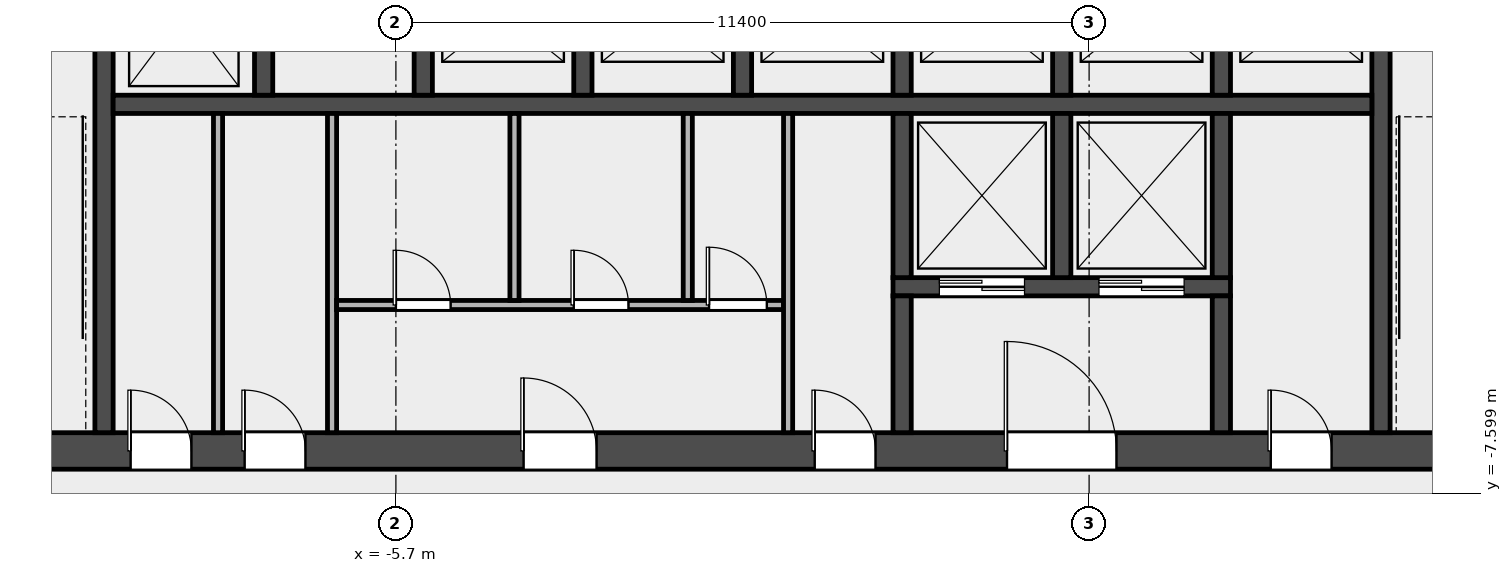
"""IFC4 building model, lengths in metres.
Left out: names, types, materials, properties, quantities, classifications, styles, units other than length and angle.
Written with IfcOpenShell. Run it as: python <this file> out.ifc"""

import sys

from ifc_helpers import new_model, si_unit, direction, frame, frame_2d, origin, place, context, subcontext, project, spatial, rectangle, extrude, element, fill, save


model = new_model("IFC4")
c1 = context("Model", 3, precision=1e-05, world=origin(), true_north=direction((0.0, 1.0)))
c2 = subcontext(c1, "Body", "Model", "MODEL_VIEW")
j1 = project(units=[si_unit("LENGTHUNIT", "METRE"), si_unit("PLANEANGLEUNIT", "RADIAN")], contexts=[c1])
p1 = place(None, origin())
s1 = spatial("IfcSite", under=j1, at=p1, CompositionType="ELEMENT")
p2 = place(p1, origin())
s2 = spatial("IfcBuilding", under=s1, at=p2, CompositionType="ELEMENT")
p3 = place(p2, frame((0.0, 0.0, 35.8)))
s3 = spatial("IfcBuildingStorey", under=s2, at=p3, CompositionType="ELEMENT", Elevation=35.8)
p4 = place(p3, frame((-14.4, -6.9, 0.0), z_axis=(0.0, 0.0, 1.0), x_axis=(1.0, 0.0, 0.0)))
e1 = element("IfcWall", 1, at=p4, inside=s3, PredefinedType="SHEAR", context=c2, shape_type="SweptSolid", body=[
    extrude(rectangle(XDim=28.8, YDim=0.6, at=frame_2d((14.4, 0.0))), origin(), (0.0, 0.0, 1.0), 4.5),
])
p5 = place(p4, frame((4.337, 0.0, 0.0)))
e2 = element("IfcOpeningElement", 2, at=p5, cuts=e1, PredefinedType="OPENING", context=c2, shape_type="SweptSolid", body=[
    extrude(rectangle(XDim=1.0, YDim=2.1, at=frame_2d((0.5, 1.05))), frame((0.0, 0.312, 0.0), z_axis=(0.0, -1.0, 0.0), x_axis=(1.0, 0.0, 0.0)), (0.0, 0.0, 1.0), 0.624),
])
p6 = place(p4, frame((6.212, 0.0, 0.0)))
e3 = element("IfcOpeningElement", 3, at=p6, cuts=e1, PredefinedType="OPENING", context=c2, shape_type="SweptSolid", body=[
    extrude(rectangle(XDim=1.0, YDim=2.1, at=frame_2d((0.5, 1.05))), frame((0.0, 0.312, 0.0), z_axis=(0.0, -1.0, 0.0), x_axis=(1.0, 0.0, 0.0)), (0.0, 0.0, 1.0), 0.624),
])
p7 = place(p4, frame((10.8, 0.0, 0.0)))
e4 = element("IfcOpeningElement", 4, at=p7, cuts=e1, PredefinedType="OPENING", context=c2, shape_type="SweptSolid", body=[
    extrude(rectangle(XDim=1.2, YDim=2.1, at=frame_2d((0.6, 1.05))), frame((0.0, 0.312, 0.0), z_axis=(0.0, -1.0, 0.0), x_axis=(1.0, 0.0, 0.0)), (0.0, 0.0, 1.0), 0.624),
])
p8 = place(p4, frame((15.587, 0.0, 0.0)))
e5 = element("IfcOpeningElement", 5, at=p8, cuts=e1, PredefinedType="OPENING", context=c2, shape_type="SweptSolid", body=[
    extrude(rectangle(XDim=1.0, YDim=2.1, at=frame_2d((0.5, 1.05))), frame((0.0, 0.312, 0.0), z_axis=(0.0, -1.0, 0.0), x_axis=(1.0, 0.0, 0.0)), (0.0, 0.0, 1.0), 0.624),
])
p9 = place(p4, frame((18.75, 0.0, 0.0)))
e6 = element("IfcOpeningElement", 6, at=p9, cuts=e1, PredefinedType="OPENING", context=c2, shape_type="SweptSolid", body=[
    extrude(rectangle(XDim=1.8, YDim=2.1, at=frame_2d((0.9, 1.05))), frame((0.0, 0.312, 0.0), z_axis=(0.0, -1.0, 0.0), x_axis=(1.0, 0.0, 0.0)), (0.0, 0.0, 1.0), 0.624),
])
p10 = place(p4, frame((23.087, 0.0, 0.0)))
e7 = element("IfcOpeningElement", 7, at=p10, cuts=e1, PredefinedType="OPENING", context=c2, shape_type="SweptSolid", body=[
    extrude(rectangle(XDim=1.0, YDim=2.1, at=frame_2d((0.5, 1.05))), frame((0.0, 0.312, 0.0), z_axis=(0.0, -1.0, 0.0), x_axis=(1.0, 0.0, 0.0)), (0.0, 0.0, 1.0), 0.624),
])
for number, where, z_axis, x_axis in (
    (8, (-10.5, -6.6, 0.0), (0.0, 0.0, 1.0), (0.0, 1.0, 0.0)),
    (9, (10.5, -6.6, 0.0), (0.0, 0.0, 1.0), (0.0, 1.0, 0.0)),
):
    element("IfcWall", number, at=place(p3, frame(where, z_axis=z_axis, x_axis=x_axis)), inside=s3, PredefinedType="SHEAR", context=c2, shape_type="SweptSolid", body=[
        extrude(rectangle(XDim=8.55, YDim=0.3, at=frame_2d((4.275, 0.0))), origin(), (0.0, 0.0, 1.0), 4.5),
    ])
p11 = place(p3, frame((-10.35, -1.2, 0.0), z_axis=(0.0, 0.0, 1.0), x_axis=(1.0, 0.0, 0.0)))
e10 = element("IfcWall", 10, at=p11, inside=s3, PredefinedType="SOLIDWALL", context=c2, shape_type="SweptSolid", body=[
    extrude(rectangle(XDim=20.7, YDim=0.3, at=frame_2d((10.35, 0.0))), origin(), (0.0, 0.0, 1.0), 4.5),
])
for number, where, z_axis, x_axis in (
    (11, (-7.875, -1.05, 0.0), (0.0, 0.0, 1.0), (0.0, 1.0, 0.0)),
    (12, (-5.25, -1.05, 0.0), (0.0, 0.0, 1.0), (0.0, 1.0, 0.0)),
    (13, (-2.625, -1.05, 0.0), (0.0, 0.0, 1.0), (0.0, 1.0, 0.0)),
    (14, (0.0, -1.05, 0.0), (0.0, 0.0, 1.0), (0.0, 1.0, 0.0)),
    (15, (2.625, -1.05, 0.0), (0.0, 0.0, 1.0), (0.0, 1.0, 0.0)),
    (16, (5.25, -1.05, 0.0), (0.0, 0.0, 1.0), (0.0, 1.0, 0.0)),
    (17, (7.875, -1.05, 0.0), (0.0, 0.0, 1.0), (0.0, 1.0, 0.0)),
):
    element("IfcWall", number, at=place(p3, frame(where, z_axis=z_axis, x_axis=x_axis)), inside=s3, PredefinedType="SOLIDWALL", context=c2, shape_type="SweptSolid", body=[
        extrude(rectangle(XDim=2.7, YDim=0.3, at=frame_2d((1.35, 0.0))), origin(), (0.0, 0.0, 1.0), 4.5),
    ])
p12 = place(p3, frame((2.475, -4.2, 0.0), z_axis=(0.0, 0.0, 1.0), x_axis=(1.0, 0.0, 0.0)))
e18 = element("IfcWall", 18, at=p12, inside=s3, PredefinedType="SOLIDWALL", context=c2, shape_type="SweptSolid", body=[
    extrude(rectangle(XDim=5.55, YDim=0.3, at=frame_2d((2.775, 0.0))), origin(), (0.0, 0.0, 1.0), 4.5),
])
p13 = place(p12, frame((0.762, 0.0, 0.0)))
e19 = element("IfcOpeningElement", 19, at=p13, cuts=e18, PredefinedType="OPENING", context=c2, shape_type="SweptSolid", body=[
    extrude(rectangle(XDim=1.4, YDim=2.1, at=frame_2d((0.7, 1.05))), frame((0.0, 0.162, 0.0), z_axis=(0.0, -1.0, 0.0), x_axis=(1.0, 0.0, 0.0)), (0.0, 0.0, 1.0), 0.324),
])
p14 = place(p12, frame((3.387, 0.0, 0.0)))
e20 = element("IfcOpeningElement", 20, at=p14, cuts=e18, PredefinedType="OPENING", context=c2, shape_type="SweptSolid", body=[
    extrude(rectangle(XDim=1.4, YDim=2.1, at=frame_2d((0.7, 1.05))), frame((0.0, 0.162, 0.0), z_axis=(0.0, -1.0, 0.0), x_axis=(1.0, 0.0, 0.0)), (0.0, 0.0, 1.0), 0.324),
])
p15 = place(p3, frame((2.625, -4.05, 0.0), z_axis=(0.0, 0.0, 1.0), x_axis=(0.0, 1.0, 0.0)))
e21 = element("IfcWall", 21, at=p15, inside=s3, PredefinedType="SOLIDWALL", context=c2, shape_type="SweptSolid", body=[
    extrude(rectangle(XDim=2.7, YDim=0.3, at=frame_2d((1.35, 0.0))), origin(), (0.0, 0.0, 1.0), 4.5),
])
p16 = place(p3, frame((2.625, -6.6, 0.0), z_axis=(0.0, 0.0, 1.0), x_axis=(0.0, 1.0, 0.0)))
e22 = element("IfcWall", 22, at=p16, inside=s3, PredefinedType="SOLIDWALL", context=c2, shape_type="SweptSolid", body=[
    extrude(rectangle(XDim=2.25, YDim=0.3, at=frame_2d((1.125, 0.0))), origin(), (0.0, 0.0, 1.0), 4.5),
])
for number, where, z_axis, x_axis in (
    (23, (5.25, -4.05, 0.0), (0.0, 0.0, 1.0), (0.0, 1.0, 0.0)),
    (24, (7.875, -4.05, 0.0), (0.0, 0.0, 1.0), (0.0, 1.0, 0.0)),
):
    element("IfcWall", number, at=place(p3, frame(where, z_axis=z_axis, x_axis=x_axis)), inside=s3, PredefinedType="SOLIDWALL", context=c2, shape_type="SweptSolid", body=[
        extrude(rectangle(XDim=2.7, YDim=0.3, at=frame_2d((1.35, 0.0))), origin(), (0.0, 0.0, 1.0), 4.5),
    ])
p17 = place(p3, frame((7.875, -6.6, 0.0), z_axis=(0.0, 0.0, 1.0), x_axis=(0.0, 1.0, 0.0)))
e25 = element("IfcWall", 25, at=p17, inside=s3, PredefinedType="SOLIDWALL", context=c2, shape_type="SweptSolid", body=[
    extrude(rectangle(XDim=2.25, YDim=0.3, at=frame_2d((1.125, 0.0))), origin(), (0.0, 0.0, 1.0), 4.5),
])
for number, where, z_axis, x_axis in (
    (26, (-8.625, -6.6, 0.0), (0.0, 0.0, 1.0), (0.0, 1.0, 0.0)),
    (27, (-6.75, -6.6, 0.0), (0.0, 0.0, 1.0), (0.0, 1.0, 0.0)),
):
    element("IfcWall", number, at=place(p3, frame(where, z_axis=z_axis, x_axis=x_axis)), inside=s3, PredefinedType="PARTITIONING", context=c2, shape_type="SweptSolid", body=[
        extrude(rectangle(XDim=5.25, YDim=0.15, at=frame_2d((2.625, 0.0))), origin(), (0.0, 0.0, 1.0), 4.5),
    ])
p18 = place(p3, frame((-6.675, -4.5, 0.0), z_axis=(0.0, 0.0, 1.0), x_axis=(1.0, 0.0, 0.0)))
e28 = element("IfcWall", 28, at=p18, inside=s3, PredefinedType="PARTITIONING", context=c2, shape_type="SweptSolid", body=[
    extrude(rectangle(XDim=7.35, YDim=0.15, at=frame_2d((3.675, 0.0))), origin(), (0.0, 0.0, 1.0), 4.5),
])
p19 = place(p18, frame((0.975, 0.0, 0.0)))
e29 = element("IfcOpeningElement", 29, at=p19, cuts=e28, PredefinedType="OPENING", context=c2, shape_type="SweptSolid", body=[
    extrude(rectangle(XDim=0.9, YDim=2.1, at=frame_2d((0.45, 1.05))), frame((0.0, 0.087, 0.0), z_axis=(0.0, -1.0, 0.0), x_axis=(1.0, 0.0, 0.0)), (0.0, 0.0, 1.0), 0.174),
])
p20 = place(p18, frame((3.9, 0.0, 0.0)))
e30 = element("IfcOpeningElement", 30, at=p20, cuts=e28, PredefinedType="OPENING", context=c2, shape_type="SweptSolid", body=[
    extrude(rectangle(XDim=0.9, YDim=2.1, at=frame_2d((0.45, 1.05))), frame((0.0, 0.087, 0.0), z_axis=(0.0, -1.0, 0.0), x_axis=(1.0, 0.0, 0.0)), (0.0, 0.0, 1.0), 0.174),
])
p21 = place(p18, frame((6.125, 0.0, 0.0)))
e31 = element("IfcOpeningElement", 31, at=p21, cuts=e28, PredefinedType="OPENING", context=c2, shape_type="SweptSolid", body=[
    extrude(rectangle(XDim=0.95, YDim=2.1, at=frame_2d((0.475, 1.05))), frame((0.0, 0.087, 0.0), z_axis=(0.0, -1.0, 0.0), x_axis=(1.0, 0.0, 0.0)), (0.0, 0.0, 1.0), 0.174),
])
for number, where, z_axis, x_axis in (
    (32, (-3.75, -4.425, 0.0), (0.0, 0.0, 1.0), (0.0, 1.0, 0.0)),
    (33, (-0.9, -4.425, 0.0), (0.0, 0.0, 1.0), (0.0, 1.0, 0.0)),
):
    element("IfcWall", number, at=place(p3, frame(where, z_axis=z_axis, x_axis=x_axis)), inside=s3, PredefinedType="PARTITIONING", context=c2, shape_type="SweptSolid", body=[
        extrude(rectangle(XDim=3.075, YDim=0.15, at=frame_2d((1.538, 0.0))), origin(), (0.0, 0.0, 1.0), 4.5),
    ])
p22 = place(p3, frame((0.75, -6.6, 0.0), z_axis=(0.0, 0.0, 1.0), x_axis=(0.0, 1.0, 0.0)))
e34 = element("IfcWall", 34, at=p22, inside=s3, PredefinedType="PARTITIONING", context=c2, shape_type="SweptSolid", body=[
    extrude(rectangle(XDim=5.25, YDim=0.15, at=frame_2d((2.625, 0.0))), origin(), (0.0, 0.0, 1.0), 4.5),
])
p23 = place(p13, origin())
e35 = element("IfcDoor", 35, at=p23, inside=s3, OperationType="DOUBLE_DOOR_SLIDING", PredefinedType="DOOR", context=c2, shape_type="SweptSolid", body=[
    extrude(rectangle(XDim=1.4, YDim=2.1, at=frame_2d((0.7, 1.05))), frame((0.0, 0.025, 0.0), z_axis=(0.0, -1.0, 0.0), x_axis=(1.0, 0.0, 0.0)), (0.0, 0.0, 1.0), 0.05),
])
fill(e19, e35)
p24 = place(p14, origin())
e36 = element("IfcDoor", 36, at=p24, inside=s3, OperationType="DOUBLE_DOOR_SLIDING", PredefinedType="DOOR", context=c2, shape_type="SweptSolid", body=[
    extrude(rectangle(XDim=1.4, YDim=2.1, at=frame_2d((0.7, 1.05))), frame((0.0, 0.025, 0.0), z_axis=(0.0, -1.0, 0.0), x_axis=(1.0, 0.0, 0.0)), (0.0, 0.0, 1.0), 0.05),
])
fill(e20, e36)
p25 = place(p5, origin())
e37 = element("IfcDoor", 37, at=p25, inside=s3, OperationType="SINGLE_SWING_LEFT", PredefinedType="DOOR", context=c2, shape_type="SweptSolid", body=[
    extrude(rectangle(XDim=1.0, YDim=2.1, at=frame_2d((0.5, 1.05))), frame((0.0, 0.025, 0.0), z_axis=(0.0, -1.0, 0.0), x_axis=(1.0, 0.0, 0.0)), (0.0, 0.0, 1.0), 0.05),
])
fill(e2, e37)
p26 = place(p6, origin())
e38 = element("IfcDoor", 38, at=p26, inside=s3, OperationType="SINGLE_SWING_LEFT", PredefinedType="DOOR", context=c2, shape_type="SweptSolid", body=[
    extrude(rectangle(XDim=1.0, YDim=2.1, at=frame_2d((0.5, 1.05))), frame((0.0, 0.025, 0.0), z_axis=(0.0, -1.0, 0.0), x_axis=(1.0, 0.0, 0.0)), (0.0, 0.0, 1.0), 0.05),
])
fill(e3, e38)
p27 = place(p7, origin())
e39 = element("IfcDoor", 39, at=p27, inside=s3, OperationType="SINGLE_SWING_LEFT", PredefinedType="DOOR", context=c2, shape_type="SweptSolid", body=[
    extrude(rectangle(XDim=1.2, YDim=2.1, at=frame_2d((0.6, 1.05))), frame((0.0, 0.025, 0.0), z_axis=(0.0, -1.0, 0.0), x_axis=(1.0, 0.0, 0.0)), (0.0, 0.0, 1.0), 0.05),
])
fill(e4, e39)
p28 = place(p19, origin())
e40 = element("IfcDoor", 40, at=p28, inside=s3, OperationType="SINGLE_SWING_LEFT", PredefinedType="DOOR", context=c2, shape_type="SweptSolid", body=[
    extrude(rectangle(XDim=0.9, YDim=2.1, at=frame_2d((0.45, 1.05))), frame((0.0, 0.025, 0.0), z_axis=(0.0, -1.0, 0.0), x_axis=(1.0, 0.0, 0.0)), (0.0, 0.0, 1.0), 0.05),
])
fill(e29, e40)
p29 = place(p20, origin())
e41 = element("IfcDoor", 41, at=p29, inside=s3, OperationType="SINGLE_SWING_LEFT", PredefinedType="DOOR", context=c2, shape_type="SweptSolid", body=[
    extrude(rectangle(XDim=0.9, YDim=2.1, at=frame_2d((0.45, 1.05))), frame((0.0, 0.025, 0.0), z_axis=(0.0, -1.0, 0.0), x_axis=(1.0, 0.0, 0.0)), (0.0, 0.0, 1.0), 0.05),
])
fill(e30, e41)
p30 = place(p21, origin())
e42 = element("IfcDoor", 42, at=p30, inside=s3, OperationType="SINGLE_SWING_LEFT", PredefinedType="DOOR", context=c2, shape_type="SweptSolid", body=[
    extrude(rectangle(XDim=0.95, YDim=2.1, at=frame_2d((0.475, 1.05))), frame((0.0, 0.025, 0.0), z_axis=(0.0, -1.0, 0.0), x_axis=(1.0, 0.0, 0.0)), (0.0, 0.0, 1.0), 0.05),
])
fill(e31, e42)
p31 = place(p8, origin())
e43 = element("IfcDoor", 43, at=p31, inside=s3, OperationType="SINGLE_SWING_LEFT", PredefinedType="DOOR", context=c2, shape_type="SweptSolid", body=[
    extrude(rectangle(XDim=1.0, YDim=2.1, at=frame_2d((0.5, 1.05))), frame((0.0, 0.025, 0.0), z_axis=(0.0, -1.0, 0.0), x_axis=(1.0, 0.0, 0.0)), (0.0, 0.0, 1.0), 0.05),
])
fill(e5, e43)
p32 = place(p9, origin())
e44 = element("IfcDoor", 44, at=p32, inside=s3, OperationType="DOUBLE_DOOR_SINGLE_SWING", PredefinedType="DOOR", context=c2, shape_type="SweptSolid", body=[
    extrude(rectangle(XDim=1.8, YDim=2.1, at=frame_2d((0.9, 1.05))), frame((0.0, 0.025, 0.0), z_axis=(0.0, -1.0, 0.0), x_axis=(1.0, 0.0, 0.0)), (0.0, 0.0, 1.0), 0.05),
])
fill(e6, e44)
p33 = place(p10, origin())
e45 = element("IfcDoor", 45, at=p33, inside=s3, OperationType="SINGLE_SWING_LEFT", PredefinedType="DOOR", context=c2, shape_type="SweptSolid", body=[
    extrude(rectangle(XDim=1.0, YDim=2.1, at=frame_2d((0.5, 1.05))), frame((0.0, 0.025, 0.0), z_axis=(0.0, -1.0, 0.0), x_axis=(1.0, 0.0, 0.0)), (0.0, 0.0, 1.0), 0.05),
])
fill(e7, e45)
save(model, sys.argv[1])
